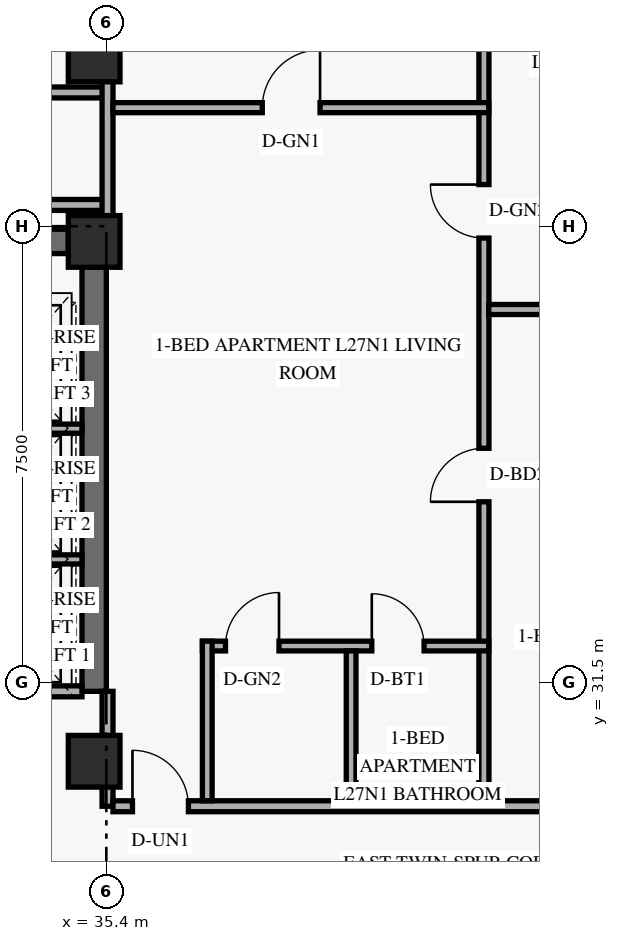
"""IFC4 building model, lengths in metres.
Left out: names, types, materials, properties, quantities, classifications, styles, units other than length and angle.
Written with IfcOpenShell. Run it as: python <this file> out.ifc"""

import sys

from ifc_helpers import new_model, si_unit, direction, frame, frame_2d, origin, origin_2d, place, context, subcontext, project, spatial, rectangle, extrude, element, fill, save


model = new_model("IFC4")
c1 = context("Model", 3, precision=1e-05, world=origin(), true_north=direction((0.0, 1.0)))
c2 = subcontext(c1, "Body", "Model", "MODEL_VIEW")
j1 = project(units=[si_unit("LENGTHUNIT", "METRE"), si_unit("PLANEANGLEUNIT", "RADIAN")], contexts=[c1])
p1 = place(None, origin())
s1 = spatial("IfcSite", under=j1, at=p1, CompositionType="ELEMENT")
p2 = place(p1, origin())
s2 = spatial("IfcBuilding", under=s1, at=p2, CompositionType="ELEMENT")
p3 = place(p2, frame((0.0, 0.0, 106.2)))
s3 = spatial("IfcBuildingStorey", under=s2, at=p3, CompositionType="ELEMENT", Elevation=106.2)
p4 = place(p3, frame((35.2, 31.35, 0.0), z_axis=(0.0, 0.0, 1.0), x_axis=(0.0, 1.0, 0.0)))
e1 = element("IfcWall", 1, at=p4, inside=s3, PredefinedType="SHEAR", context=c2, shape_type="SweptSolid", body=[
    extrude(rectangle(XDim=6.975, YDim=0.4, at=frame_2d((3.487, 0.0))), origin(), (0.0, 0.0, 1.0), 2.749),
])
p5 = place(p3, frame((24.625, 38.75, 0.0), z_axis=(0.0, 0.0, 1.0), x_axis=(1.0, 0.0, 0.0)))
e2 = element("IfcWall", 2, at=p5, inside=s3, PredefinedType="SHEAR", context=c2, shape_type="SweptSolid", body=[
    extrude(rectangle(XDim=10.15, YDim=0.4, at=frame_2d((5.075, 0.0))), origin(), (0.0, 0.0, 1.0), 3.36),
])
p6 = place(p5, frame((5.2, 0.0, 0.0)))
e3 = element("IfcOpeningElement", 3, at=p6, cuts=e2, PredefinedType="OPENING", context=c2, shape_type="SweptSolid", body=[
    extrude(rectangle(XDim=1.05, YDim=2.15, at=frame_2d((0.525, 1.075))), frame((0.0, 0.21, 0.0), z_axis=(0.0, -1.0, 0.0), x_axis=(1.0, 0.0, 0.0)), (0.0, 0.0, 1.0), 0.42),
])
for number, where, z_axis, x_axis in (
    (4, (35.2, 30.2, 0.0), (0.0, 0.0, 1.0), (1.0, 0.0, 0.0)),
    (5, (35.2, 38.75, 0.0), (0.0, 0.0, 1.0), (1.0, 0.0, 0.0)),
    (6, (35.2, 41.8, 0.0), (0.0, 0.0, 1.0), (1.0, 0.0, 0.0)),
):
    element("IfcColumn", number, at=place(p3, frame(where, z_axis=z_axis, x_axis=x_axis)), inside=s3, PredefinedType="COLUMN", context=c2, shape_type="SweptSolid", body=[
        extrude(rectangle(XDim=0.85, YDim=0.85, at=origin_2d()), origin(), (0.0, 0.0, 1.0), 3.6),
    ])
p7 = place(p3, frame((32.74, 31.35, 0.0), z_axis=(0.0, 0.0, 1.0), x_axis=(1.0, 0.0, 0.0)))
e7 = element("IfcWall", 7, at=p7, inside=s3, PredefinedType="STANDARD", context=c2, shape_type="SweptSolid", body=[
    extrude(rectangle(XDim=2.26, YDim=0.18, at=frame_2d((1.13, 0.0))), origin(), (0.0, 0.0, 1.0), 3.36),
])
for number, where, z_axis, x_axis in (
    (8, (32.74, 33.52, 0.0), (0.0, 0.0, 1.0), (1.0, 0.0, 0.0)),
    (9, (32.74, 35.67, 0.0), (0.0, 0.0, 1.0), (1.0, 0.0, 0.0)),
):
    element("IfcWall", number, at=place(p3, frame(where, z_axis=z_axis, x_axis=x_axis)), inside=s3, PredefinedType="STANDARD", context=c2, shape_type="SweptSolid", body=[
        extrude(rectangle(XDim=2.26, YDim=0.15, at=frame_2d((1.13, 0.0))), origin(), (0.0, 0.0, 1.0), 3.36),
    ])
p8 = place(p3, frame((35.42, 29.46, 0.0), z_axis=(0.0, 0.0, 1.0), x_axis=(0.0, 1.0, 0.0)))
e10 = element("IfcWall", 10, at=p8, inside=s3, PredefinedType="STANDARD", context=c2, shape_type="SweptSolid", body=[
    extrude(rectangle(XDim=1.89, YDim=0.18, at=frame_2d((0.945, 0.0))), origin(), (0.0, 0.0, 1.0), 2.731),
])
p9 = place(p3, frame((35.51, 29.46, 0.0), z_axis=(0.0, 0.0, 1.0), x_axis=(1.0, 0.0, 0.0)))
e11 = element("IfcWall", 11, at=p9, inside=s3, PredefinedType="STANDARD", context=c2, shape_type="SweptSolid", body=[
    extrude(rectangle(XDim=10.09, YDim=0.18, at=frame_2d((5.045, 0.0))), origin(), (0.0, 0.0, 1.0), 2.731),
])
p10 = place(p9, frame((0.32, 0.0, 0.0)))
e12 = element("IfcOpeningElement", 12, at=p10, cuts=e11, PredefinedType="OPENING", context=c2, shape_type="SweptSolid", body=[
    extrude(rectangle(XDim=0.92, YDim=2.15, at=frame_2d((0.46, 1.075))), frame((0.0, 0.1, 0.0), z_axis=(0.0, -1.0, 0.0), x_axis=(1.0, 0.0, 0.0)), (0.0, 0.0, 1.0), 0.2),
])
p11 = place(p3, frame((21.74, 41.2, 0.0), z_axis=(0.0, 0.0, 1.0), x_axis=(1.0, 0.0, 0.0)))
e13 = element("IfcWall", 13, at=p11, inside=s3, PredefinedType="STANDARD", context=c2, shape_type="SweptSolid", body=[
    extrude(rectangle(XDim=13.68, YDim=0.18, at=frame_2d((6.84, 0.0))), origin(), (0.0, 0.0, 1.0), 2.731),
])
p12 = place(p11, frame((3.09, 0.0, 0.0)))
e14 = element("IfcOpeningElement", 14, at=p12, cuts=e13, PredefinedType="OPENING", context=c2, shape_type="SweptSolid", body=[
    extrude(rectangle(XDim=0.95, YDim=2.15, at=frame_2d((0.475, 1.075))), frame((0.0, 0.1, 0.0), z_axis=(0.0, -1.0, 0.0), x_axis=(1.0, 0.0, 0.0)), (0.0, 0.0, 1.0), 0.2),
])
p13 = place(p11, frame((10.11, 0.0, 0.0)))
e15 = element("IfcOpeningElement", 15, at=p13, cuts=e13, PredefinedType="OPENING", context=c2, shape_type="SweptSolid", body=[
    extrude(rectangle(XDim=0.95, YDim=2.15, at=frame_2d((0.475, 1.075))), frame((0.0, 0.1, 0.0), z_axis=(0.0, -1.0, 0.0), x_axis=(1.0, 0.0, 0.0)), (0.0, 0.0, 1.0), 0.2),
])
p14 = place(p3, frame((23.85, 39.35, 0.0), z_axis=(0.0, 0.0, 1.0), x_axis=(1.0, 0.0, 0.0)))
e16 = element("IfcWall", 16, at=p14, inside=s3, PredefinedType="STANDARD", context=c2, shape_type="SweptSolid", body=[
    extrude(rectangle(XDim=11.57, YDim=0.18, at=frame_2d((5.785, 0.0))), origin(), (0.0, 0.0, 1.0), 2.731),
])
p15 = place(p3, frame((35.42, 38.75, 0.0), z_axis=(0.0, 0.0, 1.0), x_axis=(0.0, 1.0, 0.0)))
e17 = element("IfcWall", 17, at=p15, inside=s3, PredefinedType="PARTITIONING", context=c2, shape_type="SweptSolid", body=[
    extrude(rectangle(XDim=6.27, YDim=0.18, at=frame_2d((3.135, 0.0))), origin(), (0.0, 0.0, 1.0), 2.731),
])
p16 = place(p3, frame((41.61, 29.55, 0.0), z_axis=(0.0, 0.0, 1.0), x_axis=(0.0, 1.0, 0.0)))
e18 = element("IfcWall", 18, at=p16, inside=s3, PredefinedType="PARTITIONING", context=c2, shape_type="SweptSolid", body=[
    extrude(rectangle(XDim=15.47, YDim=0.165, at=frame_2d((7.735, 0.0))), origin(), (0.0, 0.0, 1.0), 2.731),
])
p17 = place(p16, frame((4.917, 0.0, 0.0)))
e19 = element("IfcOpeningElement", 19, at=p17, cuts=e18, PredefinedType="OPENING", context=c2, shape_type="SweptSolid", body=[
    extrude(rectangle(XDim=0.88, YDim=2.14, at=frame_2d((0.44, 1.07))), frame((0.0, 0.093, 0.0), z_axis=(0.0, -1.0, 0.0), x_axis=(1.0, 0.0, 0.0)), (0.0, 0.0, 1.0), 0.185),
])
p18 = place(p16, frame((9.255, 0.0, 0.0)))
e20 = element("IfcOpeningElement", 20, at=p18, cuts=e18, PredefinedType="OPENING", context=c2, shape_type="SweptSolid", body=[
    extrude(rectangle(XDim=0.88, YDim=2.12, at=frame_2d((0.44, 1.06))), frame((0.0, 0.093, 0.0), z_axis=(0.0, -1.0, 0.0), x_axis=(1.0, 0.0, 0.0)), (0.0, 0.0, 1.0), 0.185),
])
p19 = place(p3, frame((36.98, 32.095, 0.0), z_axis=(0.0, 0.0, 1.0), x_axis=(1.0, 0.0, 0.0)))
e21 = element("IfcWall", 21, at=p19, inside=s3, PredefinedType="PLUMBINGWALL", context=c2, shape_type="SweptSolid", body=[
    extrude(rectangle(XDim=4.71, YDim=0.16, at=frame_2d((2.355, 0.0))), origin(), (0.0, 0.0, 1.0), 3.36),
])
p20 = place(p19, frame((0.38, 0.0, 0.0)))
e22 = element("IfcOpeningElement", 22, at=p20, cuts=e21, PredefinedType="OPENING", context=c2, shape_type="SweptSolid", body=[
    extrude(rectangle(XDim=0.88, YDim=2.12, at=frame_2d((0.44, 1.06))), frame((0.0, 0.09, 0.0), z_axis=(0.0, -1.0, 0.0), x_axis=(1.0, 0.0, 0.0)), (0.0, 0.0, 1.0), 0.18),
])
p21 = place(p19, frame((2.786, 0.0, 0.0)))
e23 = element("IfcOpeningElement", 23, at=p21, cuts=e21, PredefinedType="OPENING", context=c2, shape_type="SweptSolid", body=[
    extrude(rectangle(XDim=0.86, YDim=2.12, at=frame_2d((0.43, 1.06))), frame((0.0, 0.09, 0.0), z_axis=(0.0, -1.0, 0.0), x_axis=(1.0, 0.0, 0.0)), (0.0, 0.0, 1.0), 0.18),
])
p22 = place(p3, frame((37.06, 29.55, 0.0), z_axis=(0.0, 0.0, 1.0), x_axis=(0.0, 1.0, 0.0)))
e24 = element("IfcWall", 24, at=p22, inside=s3, PredefinedType="PLUMBINGWALL", context=c2, shape_type="SweptSolid", body=[
    extrude(rectangle(XDim=2.625, YDim=0.16, at=frame_2d((1.312, 0.0))), origin(), (0.0, 0.0, 1.0), 2.731),
])
p23 = place(p3, frame((39.426, 29.55, 0.0), z_axis=(0.0, 0.0, 1.0), x_axis=(0.0, 1.0, 0.0)))
e25 = element("IfcWall", 25, at=p23, inside=s3, PredefinedType="PLUMBINGWALL", context=c2, shape_type="SweptSolid", body=[
    extrude(rectangle(XDim=2.465, YDim=0.16, at=frame_2d((1.232, 0.0))), origin(), (0.0, 0.0, 1.0), 2.731),
])
p24 = place(p3, frame((35.51, 40.95, 0.0), z_axis=(0.0, 0.0, 1.0), x_axis=(1.0, 0.0, 0.0)))
e26 = element("IfcWall", 26, at=p24, inside=s3, PredefinedType="PARTITIONING", context=c2, shape_type="SweptSolid", body=[
    extrude(rectangle(XDim=6.18, YDim=0.165, at=frame_2d((3.09, 0.0))), origin(), (0.0, 0.0, 1.0), 3.36),
])
p25 = place(p24, frame((2.455, 0.0, 0.0)))
e27 = element("IfcOpeningElement", 27, at=p25, cuts=e26, PredefinedType="OPENING", context=c2, shape_type="SweptSolid", body=[
    extrude(rectangle(XDim=0.95, YDim=2.15, at=frame_2d((0.475, 1.075))), frame((0.0, 0.093, 0.0), z_axis=(0.0, -1.0, 0.0), x_axis=(1.0, 0.0, 0.0)), (0.0, 0.0, 1.0), 0.185),
])
p26 = place(p3, frame((41.69, 37.63, 0.0), z_axis=(0.0, 0.0, 1.0), x_axis=(1.0, 0.0, 0.0)))
e28 = element("IfcWall", 28, at=p26, inside=s3, PredefinedType="PARTITIONING", context=c2, shape_type="SweptSolid", body=[
    extrude(rectangle(XDim=3.82, YDim=0.165, at=frame_2d((1.91, 0.0))), origin(), (0.0, 0.0, 1.0), 2.731),
])
p27 = place(p25, origin())
e29 = element("IfcDoor", 29, at=p27, inside=s3, OperationType="SINGLE_SWING_RIGHT", PredefinedType="DOOR", context=c2, shape_type="SweptSolid", body=[
    extrude(rectangle(XDim=0.95, YDim=2.15, at=frame_2d((0.475, 1.075))), frame((0.0, 0.025, 0.0), z_axis=(0.0, -1.0, 0.0), x_axis=(1.0, 0.0, 0.0)), (0.0, 0.0, 1.0), 0.05),
])
fill(e27, e29)
p28 = place(p10, origin())
e30 = element("IfcDoor", 30, at=p28, inside=s3, OperationType="SINGLE_SWING_LEFT", PredefinedType="DOOR", context=c2, shape_type="SweptSolid", body=[
    extrude(rectangle(XDim=0.92, YDim=2.15, at=frame_2d((0.46, 1.075))), frame((0.0, 0.025, 0.0), z_axis=(0.0, -1.0, 0.0), x_axis=(1.0, 0.0, 0.0)), (0.0, 0.0, 1.0), 0.05),
])
fill(e12, e30)
p29 = place(p20, origin())
e31 = element("IfcDoor", 31, at=p29, inside=s3, OperationType="SINGLE_SWING_RIGHT", PredefinedType="DOOR", context=c2, shape_type="SweptSolid", body=[
    extrude(rectangle(XDim=0.88, YDim=2.12, at=frame_2d((0.44, 1.06))), frame((0.0, 0.025, 0.0), z_axis=(0.0, -1.0, 0.0), x_axis=(1.0, 0.0, 0.0)), (0.0, 0.0, 1.0), 0.05),
])
fill(e22, e31)
p30 = place(p21, origin())
e32 = element("IfcDoor", 32, at=p30, inside=s3, OperationType="SINGLE_SWING_LEFT", PredefinedType="DOOR", context=c2, shape_type="SweptSolid", body=[
    extrude(rectangle(XDim=0.86, YDim=2.12, at=frame_2d((0.43, 1.06))), frame((0.0, 0.025, 0.0), z_axis=(0.0, -1.0, 0.0), x_axis=(1.0, 0.0, 0.0)), (0.0, 0.0, 1.0), 0.05),
])
fill(e23, e32)
p31 = place(p17, origin())
e33 = element("IfcDoor", 33, at=p31, inside=s3, OperationType="SINGLE_SWING_LEFT", PredefinedType="DOOR", context=c2, shape_type="SweptSolid", body=[
    extrude(rectangle(XDim=0.88, YDim=2.14, at=frame_2d((0.44, 1.07))), frame((0.0, 0.025, 0.0), z_axis=(0.0, -1.0, 0.0), x_axis=(1.0, 0.0, 0.0)), (0.0, 0.0, 1.0), 0.05),
])
fill(e19, e33)
p32 = place(p18, origin())
e34 = element("IfcDoor", 34, at=p32, inside=s3, OperationType="SINGLE_SWING_RIGHT", PredefinedType="DOOR", context=c2, shape_type="SweptSolid", body=[
    extrude(rectangle(XDim=0.88, YDim=2.12, at=frame_2d((0.44, 1.06))), frame((0.0, 0.025, 0.0), z_axis=(0.0, -1.0, 0.0), x_axis=(1.0, 0.0, 0.0)), (0.0, 0.0, 1.0), 0.05),
])
fill(e20, e34)
save(model, sys.argv[1])
